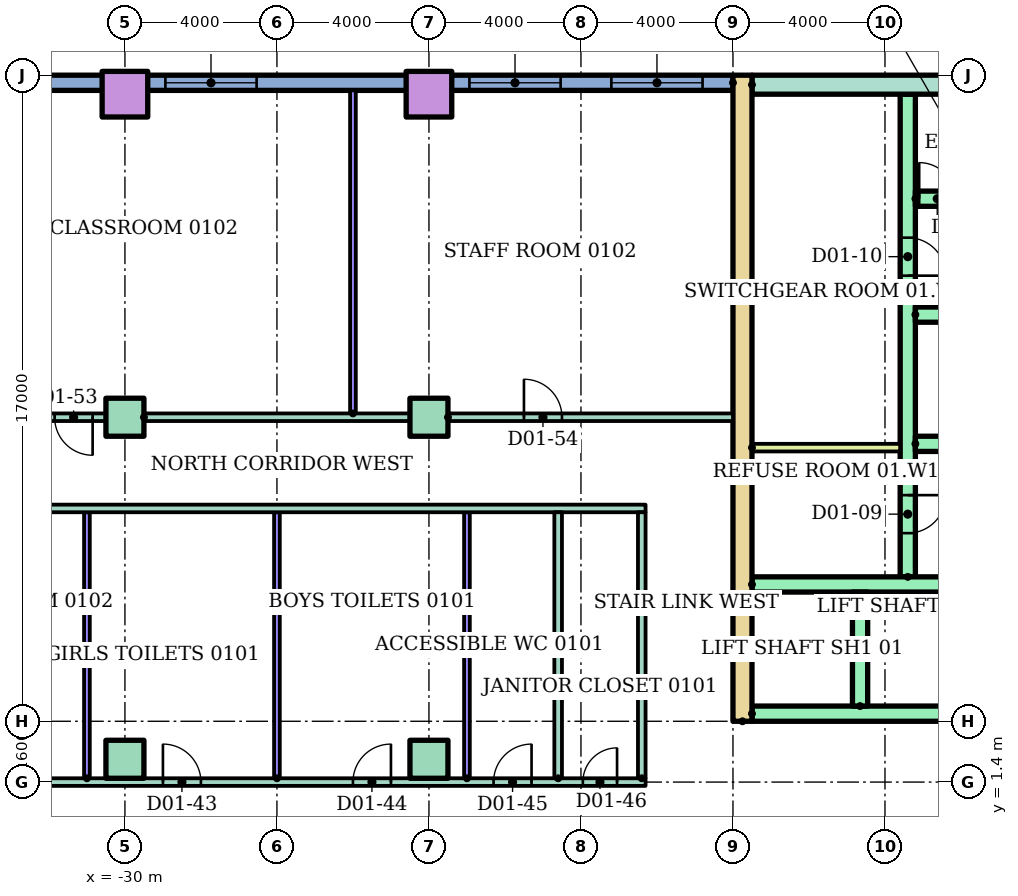
"""IFC4 building model, lengths in metres.
Left out: names, types, materials, properties, quantities, classifications, styles, units other than length and angle.
Written with IfcOpenShell. Run it as: python <this file> out.ifc"""

import sys

from ifc_helpers import new_model, si_unit, direction, frame, frame_2d, origin, origin_2d, place, context, subcontext, project, spatial, rectangle, hollow_rectangle, extrude, element, fill, save


model = new_model("IFC4")
c1 = context("Model", 3, precision=1e-05, world=origin(), true_north=direction((0.0, 1.0)))
c2 = subcontext(c1, "Body", "Model", "MODEL_VIEW")
j1 = project(units=[si_unit("LENGTHUNIT", "METRE"), si_unit("PLANEANGLEUNIT", "RADIAN")], contexts=[c1])
p1 = place(None, origin())
s1 = spatial("IfcSite", under=j1, at=p1, CompositionType="ELEMENT")
p2 = place(p1, origin())
s2 = spatial("IfcBuilding", under=s1, at=p2, CompositionType="ELEMENT")
p3 = place(p2, frame((0.0, 0.0, 6.0)))
s3 = spatial("IfcBuildingStorey", under=s2, at=p3, CompositionType="ELEMENT", Elevation=6.0)
for number, where in (
    (1, (-30.0, 2.0, 0.0)),
    (2, (-22.0, 2.0, 0.0)),
    (3, (-30.0, 11.0, 0.0)),
    (4, (-22.0, 11.0, 0.0)),
):
    element("IfcColumn", number, at=place(p3, frame(where)), inside=s3, PredefinedType="COLUMN", context=c2, shape_type="SweptSolid", body=[
        extrude(rectangle(XDim=1.0, YDim=1.0, at=origin_2d()), origin(), (0.0, 0.0, 1.0), 4.0),
    ])
for number, where in (
    (5, (-30.0, 19.5, 0.0)),
    (6, (-22.0, 19.5, 0.0)),
):
    element("IfcColumn", number, at=place(p3, frame(where)), inside=s3, PredefinedType="COLUMN", context=c2, shape_type="SweptSolid", body=[
        extrude(hollow_rectangle(XDim=1.2, YDim=1.2, WallThickness=0.06, at=origin_2d()), origin(), (0.0, 0.0, 1.0), 4.0),
    ])
p4 = place(p3, frame((-14.0, 19.8, 0.0), z_axis=(0.0, 0.0, 1.0), x_axis=(-1.0, 0.0, 0.0)))
e7 = element("IfcWall", 7, at=p4, inside=s3, PredefinedType="STANDARD", context=c2, shape_type="SweptSolid", body=[
    extrude(rectangle(XDim=25.6, YDim=0.4, at=frame_2d((12.8, 0.0))), origin(), (0.0, 0.0, 1.0), 3.7),
])
p5 = place(p4, frame((0.8, 0.0, 0.9)))
e8 = element("IfcOpeningElement", 8, at=p5, cuts=e7, PredefinedType="OPENING", context=c2, shape_type="SweptSolid", body=[
    extrude(rectangle(XDim=2.4, YDim=2.1, at=frame_2d((1.2, 1.05))), frame((0.0, 0.21, 0.0), z_axis=(0.0, -1.0, 0.0), x_axis=(1.0, 0.0, 0.0)), (0.0, 0.0, 1.0), 0.42),
])
p6 = place(p4, frame((4.535, 0.0, 0.9)))
e9 = element("IfcOpeningElement", 9, at=p6, cuts=e7, PredefinedType="OPENING", context=c2, shape_type="SweptSolid", body=[
    extrude(rectangle(XDim=2.4, YDim=2.1, at=frame_2d((1.2, 1.05))), frame((0.0, 0.21, 0.0), z_axis=(0.0, -1.0, 0.0), x_axis=(1.0, 0.0, 0.0)), (0.0, 0.0, 1.0), 0.42),
])
p7 = place(p4, frame((12.535, 0.0, 0.9)))
e10 = element("IfcOpeningElement", 10, at=p7, cuts=e7, PredefinedType="OPENING", context=c2, shape_type="SweptSolid", body=[
    extrude(rectangle(XDim=2.4, YDim=2.1, at=frame_2d((1.2, 1.05))), frame((0.0, 0.21, 0.0), z_axis=(0.0, -1.0, 0.0), x_axis=(1.0, 0.0, 0.0)), (0.0, 0.0, 1.0), 0.42),
])
p8 = place(p4, frame((20.8, 0.0, 0.9)))
e11 = element("IfcOpeningElement", 11, at=p8, cuts=e7, PredefinedType="OPENING", context=c2, shape_type="SweptSolid", body=[
    extrude(rectangle(XDim=2.4, YDim=2.1, at=frame_2d((1.2, 1.05))), frame((0.0, 0.21, 0.0), z_axis=(0.0, -1.0, 0.0), x_axis=(1.0, 0.0, 0.0)), (0.0, 0.0, 1.0), 0.42),
])
p9 = place(p3, frame((-13.75, 3.0, 0.0), z_axis=(0.0, 0.0, 1.0), x_axis=(0.0, 1.0, 0.0)))
e12 = element("IfcWall", 12, at=p9, inside=s3, PredefinedType="SHEAR", context=c2, shape_type="SweptSolid", body=[
    extrude(rectangle(XDim=17.0, YDim=0.5, at=frame_2d((8.5, 0.0))), origin(), (0.0, 0.0, 1.0), 3.7),
])
p10 = place(p3, frame((-13.5, 19.75, 0.0)))
e13 = element("IfcWall", 13, at=p10, inside=s3, PredefinedType="SHEAR", context=c2, shape_type="SweptSolid", body=[
    extrude(rectangle(XDim=27.0, YDim=0.5, at=frame_2d((13.5, 0.0))), origin(), (0.0, 0.0, 1.0), 3.7),
])
p11 = place(p3, frame((-9.4, 6.8, 0.0), z_axis=(0.0, 0.0, 1.0), x_axis=(0.0, 1.0, 0.0)))
e14 = element("IfcWall", 14, at=p11, inside=s3, PredefinedType="SHEAR", context=c2, shape_type="SweptSolid", body=[
    extrude(rectangle(XDim=12.7, YDim=0.4, at=frame_2d((6.35, 0.0))), origin(), (0.0, 0.0, 1.0), 3.7),
])
p12 = place(p11, frame((1.15, 0.0, 0.0)))
e15 = element("IfcOpeningElement", 15, at=p12, cuts=e14, PredefinedType="OPENING", context=c2, shape_type="SweptSolid", body=[
    extrude(rectangle(XDim=1.0, YDim=2.1, at=frame_2d((0.5, 1.05))), frame((0.0, 0.21, 0.0), z_axis=(0.0, -1.0, 0.0), x_axis=(1.0, 0.0, 0.0)), (0.0, 0.0, 1.0), 0.42),
])
p13 = place(p11, frame((7.925, 0.0, 0.0)))
e16 = element("IfcOpeningElement", 16, at=p13, cuts=e14, PredefinedType="OPENING", context=c2, shape_type="SweptSolid", body=[
    extrude(rectangle(XDim=1.0, YDim=2.1, at=frame_2d((0.5, 1.05))), frame((0.0, 0.21, 0.0), z_axis=(0.0, -1.0, 0.0), x_axis=(1.0, 0.0, 0.0)), (0.0, 0.0, 1.0), 0.42),
])
p14 = place(p3, frame((-13.5, 3.2, 0.0)))
e17 = element("IfcWall", 17, at=p14, inside=s3, PredefinedType="SHEAR", context=c2, shape_type="SweptSolid", body=[
    extrude(rectangle(XDim=27.0, YDim=0.4, at=frame_2d((13.5, 0.0))), origin(), (0.0, 0.0, 1.0), 3.7),
])
p15 = place(p14, frame((6.861, 0.0, 0.0)))
e18 = element("IfcOpeningElement", 18, at=p15, cuts=e17, PredefinedType="OPENING", context=c2, shape_type="SweptSolid", body=[
    extrude(rectangle(XDim=1.1, YDim=2.1, at=frame_2d((0.55, 1.05))), frame((0.0, 0.21, 0.0), z_axis=(0.0, -1.0, 0.0), x_axis=(1.0, 0.0, 0.0)), (0.0, 0.0, 1.0), 0.42),
])
p16 = place(p14, frame((9.906, 0.0, 0.0)))
e19 = element("IfcOpeningElement", 19, at=p16, cuts=e17, PredefinedType="OPENING", context=c2, shape_type="SweptSolid", body=[
    extrude(rectangle(XDim=1.1, YDim=2.1, at=frame_2d((0.55, 1.05))), frame((0.0, 0.21, 0.0), z_axis=(0.0, -1.0, 0.0), x_axis=(1.0, 0.0, 0.0)), (0.0, 0.0, 1.0), 0.42),
])
p17 = place(p14, frame((15.994, 0.0, 0.0)))
e20 = element("IfcOpeningElement", 20, at=p17, cuts=e17, PredefinedType="OPENING", context=c2, shape_type="SweptSolid", body=[
    extrude(rectangle(XDim=1.1, YDim=2.1, at=frame_2d((0.55, 1.05))), frame((0.0, 0.21, 0.0), z_axis=(0.0, -1.0, 0.0), x_axis=(1.0, 0.0, 0.0)), (0.0, 0.0, 1.0), 0.42),
])
p18 = place(p14, frame((19.039, 0.0, 0.0)))
e21 = element("IfcOpeningElement", 21, at=p18, cuts=e17, PredefinedType="OPENING", context=c2, shape_type="SweptSolid", body=[
    extrude(rectangle(XDim=1.1, YDim=2.1, at=frame_2d((0.55, 1.05))), frame((0.0, 0.21, 0.0), z_axis=(0.0, -1.0, 0.0), x_axis=(1.0, 0.0, 0.0)), (0.0, 0.0, 1.0), 0.42),
])
p19 = place(p14, frame((12.6, 0.0, 0.0)))
e22 = element("IfcOpeningElement", 22, at=p19, cuts=e17, PredefinedType="OPENING", context=c2, shape_type="SweptSolid", body=[
    extrude(rectangle(XDim=1.8, YDim=2.1, at=frame_2d((0.9, 1.05))), frame((0.0, 0.21, 0.0), z_axis=(0.0, -1.0, 0.0), x_axis=(1.0, 0.0, 0.0)), (0.0, 0.0, 1.0), 0.42),
])
p20 = place(p3, frame((-13.5, 6.6, 0.0)))
e23 = element("IfcWall", 23, at=p20, inside=s3, PredefinedType="SHEAR", context=c2, shape_type="SweptSolid", body=[
    extrude(rectangle(XDim=11.978, YDim=0.4, at=frame_2d((5.989, 0.0))), origin(), (0.0, 0.0, 1.0), 3.7),
])
p21 = place(p3, frame((-10.656, 3.4, 0.0), z_axis=(0.0, 0.0, 1.0), x_axis=(0.0, 1.0, 0.0)))
e24 = element("IfcWall", 24, at=p21, inside=s3, PredefinedType="SHEAR", context=c2, shape_type="SweptSolid", body=[
    extrude(rectangle(XDim=3.0, YDim=0.4, at=frame_2d((1.5, 0.0))), origin(), (0.0, 0.0, 1.0), 3.7),
])
p22 = place(p3, frame((-9.2, 10.3, 0.0)))
e25 = element("IfcWall", 25, at=p22, inside=s3, PredefinedType="SHEAR", context=c2, shape_type="SweptSolid", body=[
    extrude(rectangle(XDim=8.0, YDim=0.4, at=frame_2d((4.0, 0.0))), origin(), (0.0, 0.0, 1.0), 3.7),
])
p23 = place(p22, frame((2.033, 0.0, 0.0)))
e26 = element("IfcOpeningElement", 26, at=p23, cuts=e25, PredefinedType="OPENING", context=c2, shape_type="SweptSolid", body=[
    extrude(rectangle(XDim=1.0, YDim=2.1, at=frame_2d((0.5, 1.05))), frame((0.0, 0.21, 0.0), z_axis=(0.0, -1.0, 0.0), x_axis=(1.0, 0.0, 0.0)), (0.0, 0.0, 1.0), 0.42),
])
p24 = place(p22, frame((6.133, 0.0, 0.0)))
e27 = element("IfcOpeningElement", 27, at=p24, cuts=e25, PredefinedType="OPENING", context=c2, shape_type="SweptSolid", body=[
    extrude(rectangle(XDim=1.0, YDim=2.1, at=frame_2d((0.5, 1.05))), frame((0.0, 0.21, 0.0), z_axis=(0.0, -1.0, 0.0), x_axis=(1.0, 0.0, 0.0)), (0.0, 0.0, 1.0), 0.42),
])
p25 = place(p3, frame((-9.2, 13.7, 0.0)))
e28 = element("IfcWall", 28, at=p25, inside=s3, PredefinedType="SHEAR", context=c2, shape_type="SweptSolid", body=[
    extrude(rectangle(XDim=8.0, YDim=0.4, at=frame_2d((4.0, 0.0))), origin(), (0.0, 0.0, 1.0), 3.7),
])
p26 = place(p3, frame((-9.2, 16.75, 0.0)))
e29 = element("IfcWall", 29, at=p26, inside=s3, PredefinedType="SHEAR", context=c2, shape_type="SweptSolid", body=[
    extrude(rectangle(XDim=18.4, YDim=0.4, at=frame_2d((9.2, 0.0))), origin(), (0.0, 0.0, 1.0), 3.7),
])
p27 = place(p26, frame((0.1, 0.0, 0.0)))
e30 = element("IfcOpeningElement", 30, at=p27, cuts=e29, PredefinedType="OPENING", context=c2, shape_type="SweptSolid", body=[
    extrude(rectangle(XDim=0.95, YDim=2.1, at=frame_2d((0.475, 1.05))), frame((0.0, 0.21, 0.0), z_axis=(0.0, -1.0, 0.0), x_axis=(1.0, 0.0, 0.0)), (0.0, 0.0, 1.0), 0.42),
])
p28 = place(p26, frame((6.1, 0.0, 0.0)))
e31 = element("IfcOpeningElement", 31, at=p28, cuts=e29, PredefinedType="OPENING", context=c2, shape_type="SweptSolid", body=[
    extrude(rectangle(XDim=0.95, YDim=2.1, at=frame_2d((0.475, 1.05))), frame((0.0, 0.21, 0.0), z_axis=(0.0, -1.0, 0.0), x_axis=(1.0, 0.0, 0.0)), (0.0, 0.0, 1.0), 0.42),
])
p29 = place(p26, frame((12.1, 0.0, 0.0)))
e32 = element("IfcOpeningElement", 32, at=p29, cuts=e29, PredefinedType="OPENING", context=c2, shape_type="SweptSolid", body=[
    extrude(rectangle(XDim=0.95, YDim=2.1, at=frame_2d((0.475, 1.05))), frame((0.0, 0.21, 0.0), z_axis=(0.0, -1.0, 0.0), x_axis=(1.0, 0.0, 0.0)), (0.0, 0.0, 1.0), 0.42),
])
p30 = place(p3, frame((-13.5, 10.2, 0.0)))
e33 = element("IfcWall", 33, at=p30, inside=s3, PredefinedType="PARTITIONING", context=c2, shape_type="SweptSolid", body=[
    extrude(rectangle(XDim=3.9, YDim=0.2, at=frame_2d((1.95, 0.0))), origin(), (0.0, 0.0, 1.0), 3.7),
])
p31 = place(p3, frame((-36.9, 1.4, 0.0)))
e34 = element("IfcWall", 34, at=p31, inside=s3, PredefinedType="PARTITIONING", context=c2, shape_type="SweptSolid", body=[
    extrude(rectangle(XDim=20.6, YDim=0.2, at=frame_2d((10.3, 0.0))), origin(), (0.0, 0.0, 1.0), 3.7),
])
p32 = place(p31, frame((7.9, 0.0, 0.0)))
e35 = element("IfcOpeningElement", 35, at=p32, cuts=e34, PredefinedType="OPENING", context=c2, shape_type="SweptSolid", body=[
    extrude(rectangle(XDim=1.0, YDim=2.1, at=frame_2d((0.5, 1.05))), frame((0.0, 0.11, 0.0), z_axis=(0.0, -1.0, 0.0), x_axis=(1.0, 0.0, 0.0)), (0.0, 0.0, 1.0), 0.22),
])
p33 = place(p31, frame((12.9, 0.0, 0.0)))
e36 = element("IfcOpeningElement", 36, at=p33, cuts=e34, PredefinedType="OPENING", context=c2, shape_type="SweptSolid", body=[
    extrude(rectangle(XDim=1.0, YDim=2.1, at=frame_2d((0.5, 1.05))), frame((0.0, 0.11, 0.0), z_axis=(0.0, -1.0, 0.0), x_axis=(1.0, 0.0, 0.0)), (0.0, 0.0, 1.0), 0.22),
])
p34 = place(p31, frame((16.6, 0.0, 0.0)))
e37 = element("IfcOpeningElement", 37, at=p34, cuts=e34, PredefinedType="OPENING", context=c2, shape_type="SweptSolid", body=[
    extrude(rectangle(XDim=1.0, YDim=2.1, at=frame_2d((0.5, 1.05))), frame((0.0, 0.11, 0.0), z_axis=(0.0, -1.0, 0.0), x_axis=(1.0, 0.0, 0.0)), (0.0, 0.0, 1.0), 0.22),
])
p35 = place(p31, frame((18.95, 0.0, 0.0)))
e38 = element("IfcOpeningElement", 38, at=p35, cuts=e34, PredefinedType="OPENING", context=c2, shape_type="SweptSolid", body=[
    extrude(rectangle(XDim=0.9, YDim=2.1, at=frame_2d((0.45, 1.05))), frame((0.0, 0.11, 0.0), z_axis=(0.0, -1.0, 0.0), x_axis=(1.0, 0.0, 0.0)), (0.0, 0.0, 1.0), 0.22),
])
p36 = place(p3, frame((-37.6, 8.6, 0.0)))
e39 = element("IfcWall", 39, at=p36, inside=s3, PredefinedType="PARTITIONING", context=c2, shape_type="SweptSolid", body=[
    extrude(rectangle(XDim=21.3, YDim=0.2, at=frame_2d((10.65, 0.0))), origin(), (0.0, 0.0, 1.0), 3.7),
])
p37 = place(p3, frame((-36.9, 11.0, 0.0)))
e40 = element("IfcWall", 40, at=p37, inside=s3, PredefinedType="PARTITIONING", context=c2, shape_type="SweptSolid", body=[
    extrude(rectangle(XDim=6.4, YDim=0.2, at=frame_2d((3.2, 0.0))), origin(), (0.0, 0.0, 1.0), 3.7),
])
p38 = place(p37, frame((1.792, 0.0, 0.0)))
e41 = element("IfcOpeningElement", 41, at=p38, cuts=e40, PredefinedType="OPENING", context=c2, shape_type="SweptSolid", body=[
    extrude(rectangle(XDim=1.0, YDim=2.1, at=frame_2d((0.5, 1.05))), frame((0.0, 0.11, 0.0), z_axis=(0.0, -1.0, 0.0), x_axis=(1.0, 0.0, 0.0)), (0.0, 0.0, 1.0), 0.22),
])
p39 = place(p37, frame((5.05, 0.0, 0.0)))
e42 = element("IfcOpeningElement", 42, at=p39, cuts=e40, PredefinedType="OPENING", context=c2, shape_type="SweptSolid", body=[
    extrude(rectangle(XDim=1.0, YDim=2.1, at=frame_2d((0.5, 1.05))), frame((0.0, 0.11, 0.0), z_axis=(0.0, -1.0, 0.0), x_axis=(1.0, 0.0, 0.0)), (0.0, 0.0, 1.0), 0.22),
])
p40 = place(p3, frame((-29.5, 11.0, 0.0)))
e43 = element("IfcWall", 43, at=p40, inside=s3, PredefinedType="PARTITIONING", context=c2, shape_type="SweptSolid", body=[
    extrude(rectangle(XDim=7.0, YDim=0.2, at=frame_2d((3.5, 0.0))), origin(), (0.0, 0.0, 1.0), 3.7),
])
p41 = place(p3, frame((-21.5, 11.0, 0.0)))
e44 = element("IfcWall", 44, at=p41, inside=s3, PredefinedType="PARTITIONING", context=c2, shape_type="SweptSolid", body=[
    extrude(rectangle(XDim=7.5, YDim=0.2, at=frame_2d((3.75, 0.0))), origin(), (0.0, 0.0, 1.0), 3.7),
])
p42 = place(p41, frame((2.0, 0.0, 0.0)))
e45 = element("IfcOpeningElement", 45, at=p42, cuts=e44, PredefinedType="OPENING", context=c2, shape_type="SweptSolid", body=[
    extrude(rectangle(XDim=1.0, YDim=2.1, at=frame_2d((0.5, 1.05))), frame((0.0, 0.11, 0.0), z_axis=(0.0, -1.0, 0.0), x_axis=(1.0, 0.0, 0.0)), (0.0, 0.0, 1.0), 0.22),
])
for number, where, z_axis, x_axis in (
    (46, (-31.0, 1.5, 0.0), (0.0, 0.0, 1.0), (0.0, 1.0, 0.0)),
    (47, (-26.0, 1.5, 0.0), (0.0, 0.0, 1.0), (0.0, 1.0, 0.0)),
):
    element("IfcWall", number, at=place(p3, frame(where, z_axis=z_axis, x_axis=x_axis)), inside=s3, PredefinedType="PARTITIONING", context=c2, shape_type="SweptSolid", body=[
        extrude(rectangle(XDim=7.0, YDim=0.15, at=frame_2d((3.5, 0.0))), origin(), (0.0, 0.0, 1.0), 3.7),
    ])
p43 = place(p3, frame((-24.0, 11.1, 0.0), z_axis=(0.0, 0.0, 1.0), x_axis=(0.0, 1.0, 0.0)))
e48 = element("IfcWall", 48, at=p43, inside=s3, PredefinedType="PARTITIONING", context=c2, shape_type="SweptSolid", body=[
    extrude(rectangle(XDim=8.5, YDim=0.15, at=frame_2d((4.25, 0.0))), origin(), (0.0, 0.0, 1.0), 3.7),
])
p44 = place(p3, frame((-21.0, 1.5, 0.0), z_axis=(0.0, 0.0, 1.0), x_axis=(0.0, 1.0, 0.0)))
e49 = element("IfcWall", 49, at=p44, inside=s3, PredefinedType="PARTITIONING", context=c2, shape_type="SweptSolid", body=[
    extrude(rectangle(XDim=7.0, YDim=0.15, at=frame_2d((3.5, 0.0))), origin(), (0.0, 0.0, 1.0), 3.7),
])
for number, where, z_axis, x_axis in (
    (50, (-18.6, 1.5, 0.0), (0.0, 0.0, 1.0), (0.0, 1.0, 0.0)),
    (51, (-16.4, 1.5, 0.0), (0.0, 0.0, 1.0), (0.0, 1.0, 0.0)),
):
    element("IfcWall", number, at=place(p3, frame(where, z_axis=z_axis, x_axis=x_axis)), inside=s3, PredefinedType="PARTITIONING", context=c2, shape_type="SweptSolid", body=[
        extrude(rectangle(XDim=7.0, YDim=0.2, at=frame_2d((3.5, 0.0))), origin(), (0.0, 0.0, 1.0), 3.7),
    ])
p45 = place(p5, origin())
e52 = element("IfcWindow", 52, at=p45, inside=s3, PartitioningType="SINGLE_PANEL", PredefinedType="WINDOW", context=c2, shape_type="SweptSolid", body=[
    extrude(rectangle(XDim=2.4, YDim=2.1, at=frame_2d((1.2, 1.05))), frame((0.0, 0.03, 0.0), z_axis=(0.0, -1.0, 0.0), x_axis=(1.0, 0.0, 0.0)), (0.0, 0.0, 1.0), 0.06),
])
fill(e8, e52)
p46 = place(p6, origin())
e53 = element("IfcWindow", 53, at=p46, inside=s3, PartitioningType="SINGLE_PANEL", PredefinedType="WINDOW", context=c2, shape_type="SweptSolid", body=[
    extrude(rectangle(XDim=2.4, YDim=2.1, at=frame_2d((1.2, 1.05))), frame((0.0, 0.03, 0.0), z_axis=(0.0, -1.0, 0.0), x_axis=(1.0, 0.0, 0.0)), (0.0, 0.0, 1.0), 0.06),
])
fill(e9, e53)
p47 = place(p7, origin())
e54 = element("IfcWindow", 54, at=p47, inside=s3, PartitioningType="SINGLE_PANEL", PredefinedType="WINDOW", context=c2, shape_type="SweptSolid", body=[
    extrude(rectangle(XDim=2.4, YDim=2.1, at=frame_2d((1.2, 1.05))), frame((0.0, 0.03, 0.0), z_axis=(0.0, -1.0, 0.0), x_axis=(1.0, 0.0, 0.0)), (0.0, 0.0, 1.0), 0.06),
])
fill(e10, e54)
p48 = place(p27, origin())
e55 = element("IfcDoor", 55, at=p48, inside=s3, OperationType="SINGLE_SWING_LEFT", PredefinedType="DOOR", context=c2, shape_type="SweptSolid", body=[
    extrude(rectangle(XDim=0.95, YDim=2.1, at=frame_2d((0.475, 1.05))), frame((0.0, 0.025, 0.0), z_axis=(0.0, -1.0, 0.0), x_axis=(1.0, 0.0, 0.0)), (0.0, 0.0, 1.0), 0.05),
])
fill(e30, e55)
p49 = place(p12, frame((1.0, 0.0, 0.0), z_axis=(0.0, 0.0, 1.0), x_axis=(-1.0, 0.0, 0.0)))
e56 = element("IfcDoor", 56, at=p49, inside=s3, OperationType="SINGLE_SWING_RIGHT", PredefinedType="DOOR", context=c2, shape_type="SweptSolid", body=[
    extrude(rectangle(XDim=1.0, YDim=2.1, at=frame_2d((0.5, 1.05))), frame((0.0, 0.025, 0.0), z_axis=(0.0, -1.0, 0.0), x_axis=(1.0, 0.0, 0.0)), (0.0, 0.0, 1.0), 0.05),
])
fill(e15, e56)
p50 = place(p13, frame((1.0, 0.0, 0.0), z_axis=(0.0, 0.0, 1.0), x_axis=(-1.0, 0.0, 0.0)))
e57 = element("IfcDoor", 57, at=p50, inside=s3, OperationType="SINGLE_SWING_LEFT", PredefinedType="DOOR", context=c2, shape_type="SweptSolid", body=[
    extrude(rectangle(XDim=1.0, YDim=2.1, at=frame_2d((0.5, 1.05))), frame((0.0, 0.025, 0.0), z_axis=(0.0, -1.0, 0.0), x_axis=(1.0, 0.0, 0.0)), (0.0, 0.0, 1.0), 0.05),
])
fill(e16, e57)
p51 = place(p32, origin())
e58 = element("IfcDoor", 58, at=p51, inside=s3, OperationType="SINGLE_SWING_LEFT", PredefinedType="DOOR", context=c2, shape_type="SweptSolid", body=[
    extrude(rectangle(XDim=1.0, YDim=2.1, at=frame_2d((0.5, 1.05))), frame((0.0, 0.025, 0.0), z_axis=(0.0, -1.0, 0.0), x_axis=(1.0, 0.0, 0.0)), (0.0, 0.0, 1.0), 0.05),
])
fill(e35, e58)
p52 = place(p33, origin())
e59 = element("IfcDoor", 59, at=p52, inside=s3, OperationType="SINGLE_SWING_RIGHT", PredefinedType="DOOR", context=c2, shape_type="SweptSolid", body=[
    extrude(rectangle(XDim=1.0, YDim=2.1, at=frame_2d((0.5, 1.05))), frame((0.0, 0.025, 0.0), z_axis=(0.0, -1.0, 0.0), x_axis=(1.0, 0.0, 0.0)), (0.0, 0.0, 1.0), 0.05),
])
fill(e36, e59)
p53 = place(p34, origin())
e60 = element("IfcDoor", 60, at=p53, inside=s3, OperationType="SINGLE_SWING_RIGHT", PredefinedType="DOOR", context=c2, shape_type="SweptSolid", body=[
    extrude(rectangle(XDim=1.0, YDim=2.1, at=frame_2d((0.5, 1.05))), frame((0.0, 0.025, 0.0), z_axis=(0.0, -1.0, 0.0), x_axis=(1.0, 0.0, 0.0)), (0.0, 0.0, 1.0), 0.05),
])
fill(e37, e60)
p54 = place(p35, origin())
e61 = element("IfcDoor", 61, at=p54, inside=s3, OperationType="SINGLE_SWING_RIGHT", PredefinedType="DOOR", context=c2, shape_type="SweptSolid", body=[
    extrude(rectangle(XDim=0.9, YDim=2.1, at=frame_2d((0.45, 1.05))), frame((0.0, 0.025, 0.0), z_axis=(0.0, -1.0, 0.0), x_axis=(1.0, 0.0, 0.0)), (0.0, 0.0, 1.0), 0.05),
])
fill(e38, e61)
p55 = place(p39, frame((1.0, 0.0, 0.0), z_axis=(0.0, 0.0, 1.0), x_axis=(-1.0, 0.0, 0.0)))
e62 = element("IfcDoor", 62, at=p55, inside=s3, OperationType="SINGLE_SWING_RIGHT", PredefinedType="DOOR", context=c2, shape_type="SweptSolid", body=[
    extrude(rectangle(XDim=1.0, YDim=2.1, at=frame_2d((0.5, 1.05))), frame((0.0, 0.025, 0.0), z_axis=(0.0, -1.0, 0.0), x_axis=(1.0, 0.0, 0.0)), (0.0, 0.0, 1.0), 0.05),
])
fill(e42, e62)
p56 = place(p42, origin())
e63 = element("IfcDoor", 63, at=p56, inside=s3, OperationType="SINGLE_SWING_LEFT", PredefinedType="DOOR", context=c2, shape_type="SweptSolid", body=[
    extrude(rectangle(XDim=1.0, YDim=2.1, at=frame_2d((0.5, 1.05))), frame((0.0, 0.025, 0.0), z_axis=(0.0, -1.0, 0.0), x_axis=(1.0, 0.0, 0.0)), (0.0, 0.0, 1.0), 0.05),
])
fill(e45, e63)
save(model, sys.argv[1])
